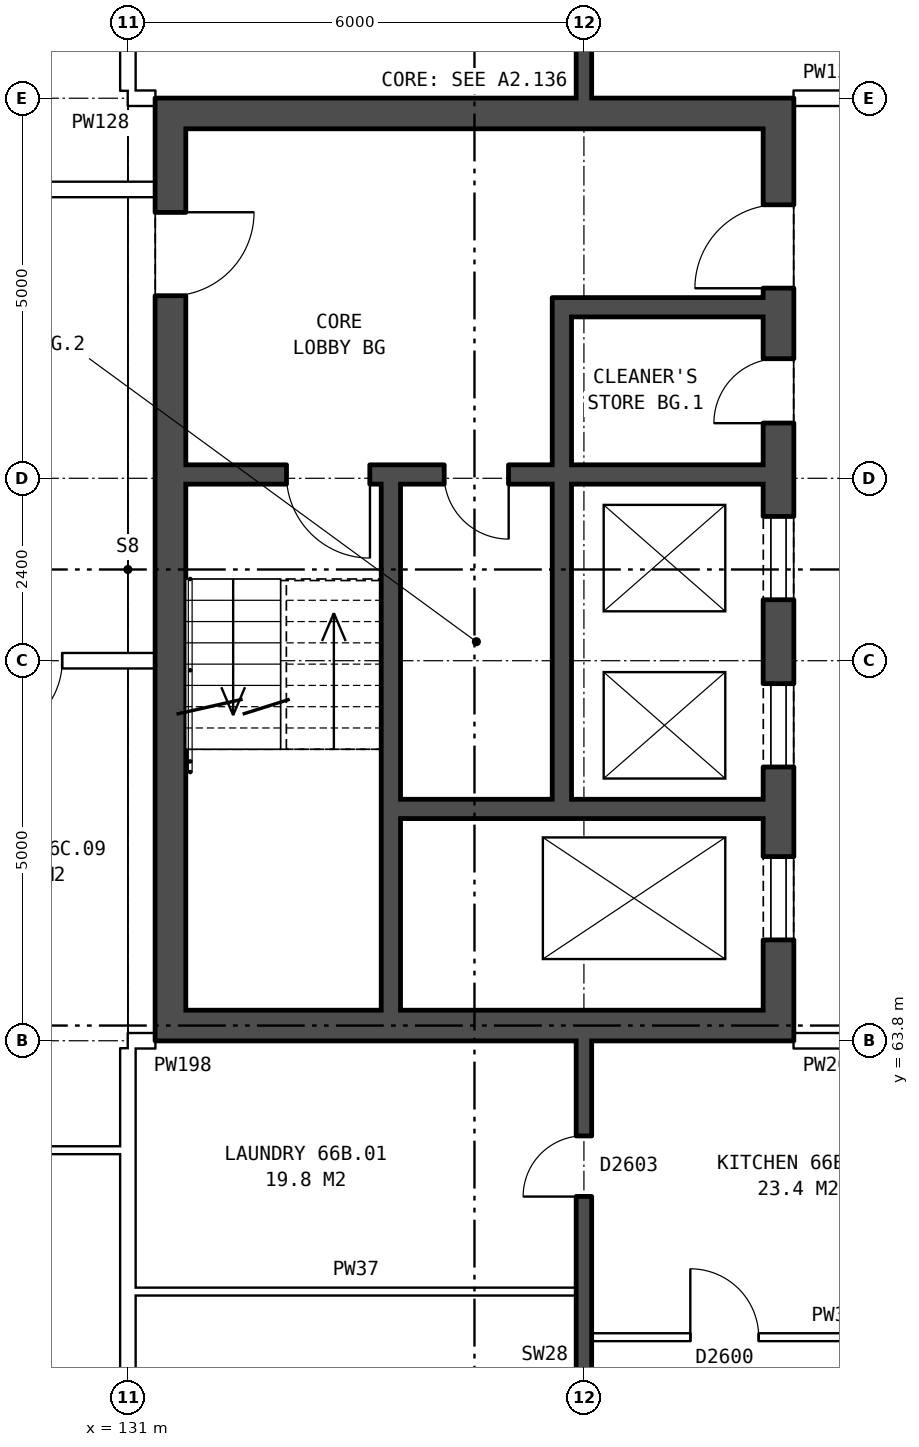
"""IFC4 building model, lengths in metres.
Left out: names, types, materials, properties, quantities, classifications, styles, units other than length and angle.
Written with IfcOpenShell. Run it as: python <this file> out.ifc"""

import sys

from ifc_helpers import new_model, si_unit, direction, frame, frame_2d, origin, place, context, subcontext, project, spatial, rectangle, extrude, element, fill, save


model = new_model("IFC4")
c1 = context("Model", 3, precision=1e-05, world=origin(), true_north=direction((0.0, 1.0)))
c2 = subcontext(c1, "Body", "Model", "MODEL_VIEW")
j1 = project(units=[si_unit("LENGTHUNIT", "METRE"), si_unit("PLANEANGLEUNIT", "RADIAN")], contexts=[c1])
p1 = place(None, origin())
s1 = spatial("IfcSite", under=j1, at=p1, CompositionType="ELEMENT")
p2 = place(p1, origin())
s2 = spatial("IfcBuilding", under=s1, at=p2, CompositionType="ELEMENT")
p3 = place(p2, frame((0.0, 0.0, 233.8)))
s3 = spatial("IfcBuildingStorey", under=s2, at=p3, CompositionType="ELEMENT", Elevation=233.8)
p4 = place(p3, frame((139.56, 63.8, 0.0), z_axis=(0.0, 0.0, 1.0), x_axis=(0.0, 1.0, 0.0)))
e1 = element("IfcWall", 1, at=p4, inside=s3, PredefinedType="SHEAR", context=c2, shape_type="SweptSolid", body=[
    extrude(rectangle(XDim=12.4, YDim=0.4, at=frame_2d((6.2, 0.0))), origin(), (0.0, 0.0, 1.0), 2.85),
])
p5 = place(p4, frame((1.325, 0.0, 0.0)))
e2 = element("IfcOpeningElement", 2, at=p5, cuts=e1, PredefinedType="OPENING", context=c2, shape_type="SweptSolid", body=[
    extrude(rectangle(XDim=1.1, YDim=2.1, at=frame_2d((0.55, 1.05))), frame((0.0, 0.21, 0.0), z_axis=(0.0, -1.0, 0.0), x_axis=(1.0, 0.0, 0.0)), (0.0, 0.0, 1.0), 0.42),
])
p6 = place(p4, frame((3.6, 0.0, 0.0)))
e3 = element("IfcOpeningElement", 3, at=p6, cuts=e1, PredefinedType="OPENING", context=c2, shape_type="SweptSolid", body=[
    extrude(rectangle(XDim=1.1, YDim=2.1, at=frame_2d((0.55, 1.05))), frame((0.0, 0.21, 0.0), z_axis=(0.0, -1.0, 0.0), x_axis=(1.0, 0.0, 0.0)), (0.0, 0.0, 1.0), 0.42),
])
p7 = place(p4, frame((5.8, 0.0, 0.0)))
e4 = element("IfcOpeningElement", 4, at=p7, cuts=e1, PredefinedType="OPENING", context=c2, shape_type="SweptSolid", body=[
    extrude(rectangle(XDim=1.1, YDim=2.1, at=frame_2d((0.55, 1.05))), frame((0.0, 0.21, 0.0), z_axis=(0.0, -1.0, 0.0), x_axis=(1.0, 0.0, 0.0)), (0.0, 0.0, 1.0), 0.42),
])
p8 = place(p4, frame((9.9, 0.0, 0.0)))
e5 = element("IfcOpeningElement", 5, at=p8, cuts=e1, PredefinedType="OPENING", context=c2, shape_type="SweptSolid", body=[
    extrude(rectangle(XDim=1.1, YDim=2.1, at=frame_2d((0.55, 1.05))), frame((0.0, 0.21, 0.0), z_axis=(0.0, -1.0, 0.0), x_axis=(1.0, 0.0, 0.0)), (0.0, 0.0, 1.0), 0.42),
])
p9 = place(p4, frame((8.125, 0.0, 0.0)))
e6 = element("IfcOpeningElement", 6, at=p9, cuts=e1, PredefinedType="OPENING", context=c2, shape_type="SweptSolid", body=[
    extrude(rectangle(XDim=0.85, YDim=2.1, at=frame_2d((0.425, 1.05))), frame((0.0, 0.21, 0.0), z_axis=(0.0, -1.0, 0.0), x_axis=(1.0, 0.0, 0.0)), (0.0, 0.0, 1.0), 0.42),
])
p10 = place(p3, frame((131.56, 63.8, 0.0), z_axis=(0.0, 0.0, 1.0), x_axis=(0.0, 1.0, 0.0)))
e7 = element("IfcWall", 7, at=p10, inside=s3, PredefinedType="SHEAR", context=c2, shape_type="SweptSolid", body=[
    extrude(rectangle(XDim=12.4, YDim=0.4, at=frame_2d((6.2, 0.0))), origin(), (0.0, 0.0, 1.0), 2.85),
])
p11 = place(p10, frame((9.8, 0.0, 0.0)))
e8 = element("IfcOpeningElement", 8, at=p11, cuts=e7, PredefinedType="OPENING", context=c2, shape_type="SweptSolid", body=[
    extrude(rectangle(XDim=1.1, YDim=2.1, at=frame_2d((0.55, 1.05))), frame((0.0, 0.21, 0.0), z_axis=(0.0, -1.0, 0.0), x_axis=(1.0, 0.0, 0.0)), (0.0, 0.0, 1.0), 0.42),
])
for number, where, z_axis, x_axis in (
    (9, (139.36, 64.0, 0.0), (0.0, 0.0, 1.0), (-1.0, 0.0, 0.0)),
    (10, (139.36, 76.0, 0.0), (0.0, 0.0, 1.0), (-1.0, 0.0, 0.0)),
):
    element("IfcWall", number, at=place(p3, frame(where, z_axis=z_axis, x_axis=x_axis)), inside=s3, PredefinedType="SHEAR", context=c2, shape_type="SweptSolid", body=[
        extrude(rectangle(XDim=7.6, YDim=0.4, at=frame_2d((3.8, 0.0))), origin(), (0.0, 0.0, 1.0), 2.85),
    ])
p12 = place(p3, frame((139.36, 66.85, 0.0), z_axis=(0.0, 0.0, 1.0), x_axis=(-1.0, 0.0, 0.0)))
e11 = element("IfcWall", 11, at=p12, inside=s3, PredefinedType="SHEAR", context=c2, shape_type="SweptSolid", body=[
    extrude(rectangle(XDim=4.775, YDim=0.25, at=frame_2d((2.388, 0.0))), origin(), (0.0, 0.0, 1.0), 2.85),
])
p13 = place(p3, frame((139.36, 71.25, 0.0), z_axis=(0.0, 0.0, 1.0), x_axis=(-1.0, 0.0, 0.0)))
e12 = element("IfcWall", 12, at=p13, inside=s3, PredefinedType="SHEAR", context=c2, shape_type="SweptSolid", body=[
    extrude(rectangle(XDim=7.6, YDim=0.25, at=frame_2d((3.8, 0.0))), origin(), (0.0, 0.0, 1.0), 2.85),
])
p14 = place(p13, frame((5.175, 0.0, 0.0)))
e13 = element("IfcOpeningElement", 13, at=p14, cuts=e12, PredefinedType="OPENING", context=c2, shape_type="SweptSolid", body=[
    extrude(rectangle(XDim=1.1, YDim=2.1, at=frame_2d((0.55, 1.05))), frame((0.0, 0.135, 0.0), z_axis=(0.0, -1.0, 0.0), x_axis=(1.0, 0.0, 0.0)), (0.0, 0.0, 1.0), 0.27),
])
p15 = place(p13, frame((3.35, 0.0, 0.0)))
e14 = element("IfcOpeningElement", 14, at=p15, cuts=e12, PredefinedType="OPENING", context=c2, shape_type="SweptSolid", body=[
    extrude(rectangle(XDim=0.85, YDim=2.1, at=frame_2d((0.425, 1.05))), frame((0.0, 0.135, 0.0), z_axis=(0.0, -1.0, 0.0), x_axis=(1.0, 0.0, 0.0)), (0.0, 0.0, 1.0), 0.27),
])
p16 = place(p3, frame((139.36, 73.45, 0.0), z_axis=(0.0, 0.0, 1.0), x_axis=(-1.0, 0.0, 0.0)))
e15 = element("IfcWall", 15, at=p16, inside=s3, PredefinedType="SHEAR", context=c2, shape_type="SweptSolid", body=[
    extrude(rectangle(XDim=2.525, YDim=0.25, at=frame_2d((1.263, 0.0))), origin(), (0.0, 0.0, 1.0), 2.85),
])
p17 = place(p3, frame((136.71, 66.975, 0.0), z_axis=(0.0, 0.0, 1.0), x_axis=(0.0, 1.0, 0.0)))
e16 = element("IfcWall", 16, at=p17, inside=s3, PredefinedType="SHEAR", context=c2, shape_type="SweptSolid", body=[
    extrude(rectangle(XDim=4.15, YDim=0.25, at=frame_2d((2.075, 0.0))), origin(), (0.0, 0.0, 1.0), 2.85),
])
p18 = place(p3, frame((136.71, 71.375, 0.0), z_axis=(0.0, 0.0, 1.0), x_axis=(0.0, 1.0, 0.0)))
e17 = element("IfcWall", 17, at=p18, inside=s3, PredefinedType="SHEAR", context=c2, shape_type="SweptSolid", body=[
    extrude(rectangle(XDim=2.2, YDim=0.25, at=frame_2d((1.1, 0.0))), origin(), (0.0, 0.0, 1.0), 2.85),
])
p19 = place(p3, frame((134.46, 64.2, 0.0), z_axis=(0.0, 0.0, 1.0), x_axis=(0.0, 1.0, 0.0)))
e18 = element("IfcWall", 18, at=p19, inside=s3, PredefinedType="SHEAR", context=c2, shape_type="SweptSolid", body=[
    extrude(rectangle(XDim=6.925, YDim=0.25, at=frame_2d((3.462, 0.0))), origin(), (0.0, 0.0, 1.0), 2.85),
])
p20 = place(p3, frame((137.1, 59.9, 0.0), z_axis=(0.0, 0.0, 1.0), x_axis=(1.0, 0.0, 0.0)))
e19 = element("IfcWall", 19, at=p20, inside=s3, PredefinedType="PARTITIONING", context=c2, shape_type="SweptSolid", body=[
    extrude(rectangle(XDim=5.8, YDim=0.1, at=frame_2d((2.9, 0.0))), origin(), (0.0, 0.0, 1.0), 2.85),
])
p21 = place(p20, frame((1.3, 0.0, 0.0)))
e20 = element("IfcOpeningElement", 20, at=p21, cuts=e19, PredefinedType="OPENING", context=c2, shape_type="SweptSolid", body=[
    extrude(rectangle(XDim=0.9, YDim=2.1, at=frame_2d((0.45, 1.05))), frame((0.0, 0.06, 0.0), z_axis=(0.0, -1.0, 0.0), x_axis=(1.0, 0.0, 0.0)), (0.0, 0.0, 1.0), 0.12),
])
p22 = place(p20, frame((4.2, 0.0, 0.0)))
e21 = element("IfcOpeningElement", 21, at=p22, cuts=e19, PredefinedType="OPENING", context=c2, shape_type="SweptSolid", body=[
    extrude(rectangle(XDim=0.9, YDim=2.1, at=frame_2d((0.45, 1.05))), frame((0.0, 0.06, 0.0), z_axis=(0.0, -1.0, 0.0), x_axis=(1.0, 0.0, 0.0)), (0.0, 0.0, 1.0), 0.12),
])
p23 = place(p3, frame((131.1, 60.5, 0.0), z_axis=(0.0, 0.0, 1.0), x_axis=(1.0, 0.0, 0.0)))
e22 = element("IfcWall", 22, at=p23, inside=s3, PredefinedType="PARTITIONING", context=c2, shape_type="SweptSolid", body=[
    extrude(rectangle(XDim=5.8, YDim=0.1, at=frame_2d((2.9, 0.0))), origin(), (0.0, 0.0, 1.0), 2.85),
])
p24 = place(p3, frame((127.912, 62.36, 0.0), z_axis=(0.0, 0.0, 1.0), x_axis=(1.0, 0.0, 0.0)))
e23 = element("IfcWall", 23, at=p24, inside=s3, PredefinedType="PARTITIONING", context=c2, shape_type="SweptSolid", body=[
    extrude(rectangle(XDim=2.988, YDim=0.1, at=frame_2d((1.494, 0.0))), origin(), (0.0, 0.0, 1.0), 2.85),
])
p25 = place(p24, frame((1.044, 0.0, 0.0)))
e24 = element("IfcOpeningElement", 24, at=p25, cuts=e23, PredefinedType="OPENING", context=c2, shape_type="SweptSolid", body=[
    extrude(rectangle(XDim=0.9, YDim=2.1, at=frame_2d((0.45, 1.05))), frame((0.0, 0.06, 0.0), z_axis=(0.0, -1.0, 0.0), x_axis=(1.0, 0.0, 0.0)), (0.0, 0.0, 1.0), 0.12),
])
p26 = place(p3, frame((131.0, 63.8, 0.0), z_axis=(0.0, 0.0, 1.0), x_axis=(1.0, 0.0, 0.0)))
e25 = element("IfcWall", 25, at=p26, inside=s3, PredefinedType="PARTITIONING", context=c2, shape_type="SweptSolid", body=[
    extrude(rectangle(XDim=0.36, YDim=0.2, at=frame_2d((0.18, 0.0))), origin(), (0.0, 0.0, 1.0), 2.85),
])
p27 = place(p3, frame((139.76, 63.8, 0.0), z_axis=(0.0, 0.0, 1.0), x_axis=(1.0, 0.0, 0.0)))
e26 = element("IfcWall", 26, at=p27, inside=s3, PredefinedType="PARTITIONING", context=c2, shape_type="SweptSolid", body=[
    extrude(rectangle(XDim=3.0, YDim=0.2, at=frame_2d((1.5, 0.0))), origin(), (0.0, 0.0, 1.0), 2.85),
])
p28 = place(p27, frame((1.0, 0.0, 0.0)))
e27 = element("IfcOpeningElement", 27, at=p28, cuts=e26, PredefinedType="OPENING", context=c2, shape_type="SweptSolid", body=[
    extrude(rectangle(XDim=1.0, YDim=2.1, at=frame_2d((0.5, 1.05))), frame((0.0, 0.11, 0.0), z_axis=(0.0, -1.0, 0.0), x_axis=(1.0, 0.0, 0.0)), (0.0, 0.0, 1.0), 0.22),
])
p29 = place(p3, frame((75.64, 68.8, 0.0), z_axis=(0.0, 0.0, 1.0), x_axis=(1.0, 0.0, 0.0)))
e28 = element("IfcWall", 28, at=p29, inside=s3, PredefinedType="PARTITIONING", context=c2, shape_type="SweptSolid", body=[
    extrude(rectangle(XDim=55.72, YDim=0.2, at=frame_2d((27.86, 0.0))), origin(), (0.0, 0.0, 1.0), 2.85),
])
p30 = place(p29, frame((5.191, 0.0, 0.0)))
e29 = element("IfcOpeningElement", 29, at=p30, cuts=e28, PredefinedType="OPENING", context=c2, shape_type="SweptSolid", body=[
    extrude(rectangle(XDim=1.0, YDim=2.1, at=frame_2d((0.5, 1.05))), frame((0.0, 0.11, 0.0), z_axis=(0.0, -1.0, 0.0), x_axis=(1.0, 0.0, 0.0)), (0.0, 0.0, 1.0), 0.22),
])
p31 = place(p29, frame((12.241, 0.0, 0.0)))
e30 = element("IfcOpeningElement", 30, at=p31, cuts=e28, PredefinedType="OPENING", context=c2, shape_type="SweptSolid", body=[
    extrude(rectangle(XDim=1.0, YDim=2.1, at=frame_2d((0.5, 1.05))), frame((0.0, 0.11, 0.0), z_axis=(0.0, -1.0, 0.0), x_axis=(1.0, 0.0, 0.0)), (0.0, 0.0, 1.0), 0.22),
])
p32 = place(p29, frame((22.553, 0.0, 0.0)))
e31 = element("IfcOpeningElement", 31, at=p32, cuts=e28, PredefinedType="OPENING", context=c2, shape_type="SweptSolid", body=[
    extrude(rectangle(XDim=1.0, YDim=2.1, at=frame_2d((0.5, 1.05))), frame((0.0, 0.11, 0.0), z_axis=(0.0, -1.0, 0.0), x_axis=(1.0, 0.0, 0.0)), (0.0, 0.0, 1.0), 0.22),
])
p33 = place(p29, frame((32.866, 0.0, 0.0)))
e32 = element("IfcOpeningElement", 32, at=p33, cuts=e28, PredefinedType="OPENING", context=c2, shape_type="SweptSolid", body=[
    extrude(rectangle(XDim=1.0, YDim=2.1, at=frame_2d((0.5, 1.05))), frame((0.0, 0.11, 0.0), z_axis=(0.0, -1.0, 0.0), x_axis=(1.0, 0.0, 0.0)), (0.0, 0.0, 1.0), 0.22),
])
p34 = place(p29, frame((36.303, 0.0, 0.0)))
e33 = element("IfcOpeningElement", 33, at=p34, cuts=e28, PredefinedType="OPENING", context=c2, shape_type="SweptSolid", body=[
    extrude(rectangle(XDim=1.0, YDim=2.1, at=frame_2d((0.5, 1.05))), frame((0.0, 0.11, 0.0), z_axis=(0.0, -1.0, 0.0), x_axis=(1.0, 0.0, 0.0)), (0.0, 0.0, 1.0), 0.22),
])
p35 = place(p29, frame((46.616, 0.0, 0.0)))
e34 = element("IfcOpeningElement", 34, at=p35, cuts=e28, PredefinedType="OPENING", context=c2, shape_type="SweptSolid", body=[
    extrude(rectangle(XDim=1.0, YDim=2.1, at=frame_2d((0.5, 1.05))), frame((0.0, 0.11, 0.0), z_axis=(0.0, -1.0, 0.0), x_axis=(1.0, 0.0, 0.0)), (0.0, 0.0, 1.0), 0.22),
])
p36 = place(p29, frame((53.496, 0.0, 0.0)))
e35 = element("IfcOpeningElement", 35, at=p36, cuts=e28, PredefinedType="OPENING", context=c2, shape_type="SweptSolid", body=[
    extrude(rectangle(XDim=1.0, YDim=2.1, at=frame_2d((0.5, 1.05))), frame((0.0, 0.11, 0.0), z_axis=(0.0, -1.0, 0.0), x_axis=(1.0, 0.0, 0.0)), (0.0, 0.0, 1.0), 0.22),
])
p37 = place(p3, frame((124.475, 75.0, 0.0), z_axis=(0.0, 0.0, 1.0), x_axis=(1.0, 0.0, 0.0)))
e36 = element("IfcWall", 36, at=p37, inside=s3, PredefinedType="PARTITIONING", context=c2, shape_type="SweptSolid", body=[
    extrude(rectangle(XDim=6.885, YDim=0.2, at=frame_2d((3.442, 0.0))), origin(), (0.0, 0.0, 1.0), 2.85),
])
p38 = place(p37, frame((2.992, 0.0, 0.0)))
e37 = element("IfcOpeningElement", 37, at=p38, cuts=e36, PredefinedType="OPENING", context=c2, shape_type="SweptSolid", body=[
    extrude(rectangle(XDim=0.9, YDim=2.1, at=frame_2d((0.45, 1.05))), frame((0.0, 0.11, 0.0), z_axis=(0.0, -1.0, 0.0), x_axis=(1.0, 0.0, 0.0)), (0.0, 0.0, 1.0), 0.22),
])
p39 = place(p3, frame((131.0, 76.2, 0.0), z_axis=(0.0, 0.0, 1.0), x_axis=(1.0, 0.0, 0.0)))
e38 = element("IfcWall", 38, at=p39, inside=s3, PredefinedType="PARTITIONING", context=c2, shape_type="SweptSolid", body=[
    extrude(rectangle(XDim=0.36, YDim=0.2, at=frame_2d((0.18, 0.0))), origin(), (0.0, 0.0, 1.0), 2.85),
])
p40 = place(p3, frame((139.76, 76.2, 0.0), z_axis=(0.0, 0.0, 1.0), x_axis=(1.0, 0.0, 0.0)))
e39 = element("IfcWall", 39, at=p40, inside=s3, PredefinedType="PARTITIONING", context=c2, shape_type="SweptSolid", body=[
    extrude(rectangle(XDim=3.0, YDim=0.2, at=frame_2d((1.5, 0.0))), origin(), (0.0, 0.0, 1.0), 2.85),
])
p41 = place(p40, frame((1.0, 0.0, 0.0)))
e40 = element("IfcOpeningElement", 40, at=p41, cuts=e39, PredefinedType="OPENING", context=c2, shape_type="SweptSolid", body=[
    extrude(rectangle(XDim=1.0, YDim=2.1, at=frame_2d((0.5, 1.05))), frame((0.0, 0.11, 0.0), z_axis=(0.0, -1.0, 0.0), x_axis=(1.0, 0.0, 0.0)), (0.0, 0.0, 1.0), 0.22),
])
for number, where, z_axis, x_axis in (
    (41, (131.0, 54.36, 0.0), (0.0, 0.0, 1.0), (0.0, 1.0, 0.0)),
    (42, (131.0, 76.3, 0.0), (0.0, 0.0, 1.0), (0.0, 1.0, 0.0)),
):
    element("IfcWall", number, at=place(p3, frame(where, z_axis=z_axis, x_axis=x_axis)), inside=s3, PredefinedType="PARTITIONING", context=c2, shape_type="SweptSolid", body=[
        extrude(rectangle(XDim=9.34, YDim=0.2, at=frame_2d((4.67, 0.0))), origin(), (0.0, 0.0, 1.0), 2.85),
    ])
p42 = place(p3, frame((137.0, 54.36, 0.0), z_axis=(0.0, 0.0, 1.0), x_axis=(0.0, 1.0, 0.0)))
e43 = element("IfcWall", 43, at=p42, inside=s3, PredefinedType="SOLIDWALL", context=c2, shape_type="SweptSolid", body=[
    extrude(rectangle(XDim=9.44, YDim=0.2, at=frame_2d((4.72, 0.0))), origin(), (0.0, 0.0, 1.0), 2.85),
])
p43 = place(p42, frame((2.32, 0.0, 0.0)))
e44 = element("IfcOpeningElement", 44, at=p43, cuts=e43, PredefinedType="OPENING", context=c2, shape_type="SweptSolid", body=[
    extrude(rectangle(XDim=0.9, YDim=2.1, at=frame_2d((0.45, 1.05))), frame((0.0, 0.11, 0.0), z_axis=(0.0, -1.0, 0.0), x_axis=(1.0, 0.0, 0.0)), (0.0, 0.0, 1.0), 0.22),
])
p44 = place(p42, frame((7.39, 0.0, 0.0)))
e45 = element("IfcOpeningElement", 45, at=p44, cuts=e43, PredefinedType="OPENING", context=c2, shape_type="SweptSolid", body=[
    extrude(rectangle(XDim=0.8, YDim=2.1, at=frame_2d((0.4, 1.05))), frame((0.0, 0.11, 0.0), z_axis=(0.0, -1.0, 0.0), x_axis=(1.0, 0.0, 0.0)), (0.0, 0.0, 1.0), 0.22),
])
p45 = place(p3, frame((137.0, 76.2, 0.0), z_axis=(0.0, 0.0, 1.0), x_axis=(0.0, 1.0, 0.0)))
e46 = element("IfcWall", 46, at=p45, inside=s3, PredefinedType="SOLIDWALL", context=c2, shape_type="SweptSolid", body=[
    extrude(rectangle(XDim=9.44, YDim=0.2, at=frame_2d((4.72, 0.0))), origin(), (0.0, 0.0, 1.0), 2.85),
])
p46 = place(p45, frame((6.22, 0.0, 0.0)))
e47 = element("IfcOpeningElement", 47, at=p46, cuts=e46, PredefinedType="OPENING", context=c2, shape_type="SweptSolid", body=[
    extrude(rectangle(XDim=0.9, YDim=2.1, at=frame_2d((0.45, 1.05))), frame((0.0, 0.11, 0.0), z_axis=(0.0, -1.0, 0.0), x_axis=(1.0, 0.0, 0.0)), (0.0, 0.0, 1.0), 0.22),
])
p47 = place(p45, frame((1.25, 0.0, 0.0)))
e48 = element("IfcOpeningElement", 48, at=p47, cuts=e46, PredefinedType="OPENING", context=c2, shape_type="SweptSolid", body=[
    extrude(rectangle(XDim=0.8, YDim=2.1, at=frame_2d((0.4, 1.05))), frame((0.0, 0.11, 0.0), z_axis=(0.0, -1.0, 0.0), x_axis=(1.0, 0.0, 0.0)), (0.0, 0.0, 1.0), 0.22),
])
p48 = place(p5, origin())
e49 = element("IfcDoor", 49, at=p48, inside=s3, OperationType="DOUBLE_DOOR_SLIDING", PredefinedType="DOOR", context=c2, shape_type="SweptSolid", body=[
    extrude(rectangle(XDim=1.1, YDim=2.1, at=frame_2d((0.55, 1.05))), frame((0.0, 0.185, 0.0), z_axis=(0.0, -1.0, 0.0), x_axis=(1.0, 0.0, 0.0)), (0.0, 0.0, 1.0), 0.05),
])
fill(e2, e49)
p49 = place(p6, origin())
e50 = element("IfcDoor", 50, at=p49, inside=s3, OperationType="DOUBLE_DOOR_SLIDING", PredefinedType="DOOR", context=c2, shape_type="SweptSolid", body=[
    extrude(rectangle(XDim=1.1, YDim=2.1, at=frame_2d((0.55, 1.05))), frame((0.0, 0.185, 0.0), z_axis=(0.0, -1.0, 0.0), x_axis=(1.0, 0.0, 0.0)), (0.0, 0.0, 1.0), 0.05),
])
fill(e3, e50)
p50 = place(p7, origin())
e51 = element("IfcDoor", 51, at=p50, inside=s3, OperationType="DOUBLE_DOOR_SLIDING", PredefinedType="DOOR", context=c2, shape_type="SweptSolid", body=[
    extrude(rectangle(XDim=1.1, YDim=2.1, at=frame_2d((0.55, 1.05))), frame((0.0, 0.185, 0.0), z_axis=(0.0, -1.0, 0.0), x_axis=(1.0, 0.0, 0.0)), (0.0, 0.0, 1.0), 0.05),
])
fill(e4, e51)
p51 = place(p8, origin())
e52 = element("IfcDoor", 52, at=p51, inside=s3, OperationType="SINGLE_SWING_LEFT", PredefinedType="DOOR", context=c2, shape_type="SweptSolid", body=[
    extrude(rectangle(XDim=1.1, YDim=2.1, at=frame_2d((0.55, 1.05))), frame((0.0, 0.185, 0.0), z_axis=(0.0, -1.0, 0.0), x_axis=(1.0, 0.0, 0.0)), (0.0, 0.0, 1.0), 0.05),
])
fill(e5, e52)
p52 = place(p14, origin())
e53 = element("IfcDoor", 53, at=p52, inside=s3, OperationType="SINGLE_SWING_LEFT", PredefinedType="DOOR", context=c2, shape_type="SweptSolid", body=[
    extrude(rectangle(XDim=1.1, YDim=2.1, at=frame_2d((0.55, 1.05))), frame((0.0, 0.025, 0.0), z_axis=(0.0, -1.0, 0.0), x_axis=(1.0, 0.0, 0.0)), (0.0, 0.0, 1.0), 0.05),
])
fill(e13, e53)
p53 = place(p9, origin())
e54 = element("IfcDoor", 54, at=p53, inside=s3, OperationType="SINGLE_SWING_LEFT", PredefinedType="DOOR", context=c2, shape_type="SweptSolid", body=[
    extrude(rectangle(XDim=0.85, YDim=2.1, at=frame_2d((0.425, 1.05))), frame((0.0, 0.185, 0.0), z_axis=(0.0, -1.0, 0.0), x_axis=(1.0, 0.0, 0.0)), (0.0, 0.0, 1.0), 0.05),
])
fill(e6, e54)
p54 = place(p15, origin())
e55 = element("IfcDoor", 55, at=p54, inside=s3, OperationType="SINGLE_SWING_LEFT", PredefinedType="DOOR", context=c2, shape_type="SweptSolid", body=[
    extrude(rectangle(XDim=0.85, YDim=2.1, at=frame_2d((0.425, 1.05))), frame((0.0, 0.025, 0.0), z_axis=(0.0, -1.0, 0.0), x_axis=(1.0, 0.0, 0.0)), (0.0, 0.0, 1.0), 0.05),
])
fill(e14, e55)
p55 = place(p11, frame((1.1, 0.0, 0.0), z_axis=(0.0, 0.0, 1.0), x_axis=(-1.0, 0.0, 0.0)))
e56 = element("IfcDoor", 56, at=p55, inside=s3, OperationType="SINGLE_SWING_LEFT", PredefinedType="DOOR", context=c2, shape_type="SweptSolid", body=[
    extrude(rectangle(XDim=1.1, YDim=2.1, at=frame_2d((0.55, 1.05))), frame((0.0, 0.185, 0.0), z_axis=(0.0, -1.0, 0.0), x_axis=(1.0, 0.0, 0.0)), (0.0, 0.0, 1.0), 0.05),
])
fill(e8, e56)
p56 = place(p21, origin())
e57 = element("IfcDoor", 57, at=p56, inside=s3, OperationType="SINGLE_SWING_LEFT", PredefinedType="DOOR", context=c2, shape_type="SweptSolid", body=[
    extrude(rectangle(XDim=0.9, YDim=2.1, at=frame_2d((0.45, 1.05))), frame((0.0, 0.025, 0.0), z_axis=(0.0, -1.0, 0.0), x_axis=(1.0, 0.0, 0.0)), (0.0, 0.0, 1.0), 0.05),
])
fill(e20, e57)
p57 = place(p44, origin())
e58 = element("IfcDoor", 58, at=p57, inside=s3, OperationType="SINGLE_SWING_LEFT", PredefinedType="DOOR", context=c2, shape_type="SweptSolid", body=[
    extrude(rectangle(XDim=0.8, YDim=2.1, at=frame_2d((0.4, 1.05))), frame((0.0, 0.025, 0.0), z_axis=(0.0, -1.0, 0.0), x_axis=(1.0, 0.0, 0.0)), (0.0, 0.0, 1.0), 0.05),
])
fill(e45, e58)
p58 = place(p36, frame((1.0, 0.0, 0.0), z_axis=(0.0, 0.0, 1.0), x_axis=(-1.0, 0.0, 0.0)))
e59 = element("IfcDoor", 59, at=p58, inside=s3, OperationType="SINGLE_SWING_RIGHT", PredefinedType="DOOR", context=c2, shape_type="SweptSolid", body=[
    extrude(rectangle(XDim=1.0, YDim=2.1, at=frame_2d((0.5, 1.05))), frame((0.0, 0.025, 0.0), z_axis=(0.0, -1.0, 0.0), x_axis=(1.0, 0.0, 0.0)), (0.0, 0.0, 1.0), 0.05),
])
fill(e35, e59)
save(model, sys.argv[1])
